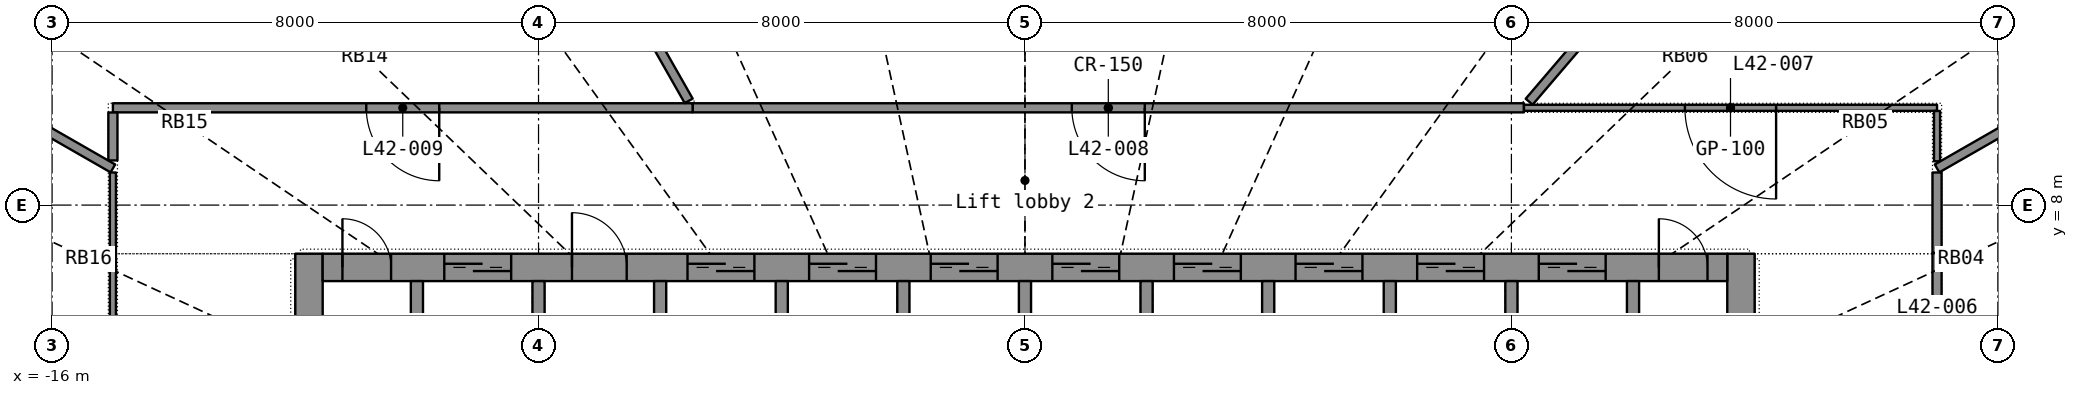
"""IFC4 building model, lengths in metres.
Left out: names, types, materials, properties, quantities, classifications, styles, units other than length and angle.
Written with IfcOpenShell. Run it as: python <this file> out.ifc"""

import sys

from ifc_helpers import new_model, si_unit, direction, frame, frame_2d, origin, place, context, subcontext, project, spatial, rectangle, extrude, element, fill, save


model = new_model("IFC4")
c1 = context("Model", 3, precision=1e-05, world=origin(), true_north=direction((0.0, 1.0)))
c2 = subcontext(c1, "Body", "Model", "MODEL_VIEW")
j1 = project(units=[si_unit("LENGTHUNIT", "METRE"), si_unit("PLANEANGLEUNIT", "RADIAN")], contexts=[c1])
p1 = place(None, origin())
s1 = spatial("IfcSite", under=j1, at=p1, CompositionType="ELEMENT")
p2 = place(p1, origin())
s2 = spatial("IfcBuilding", under=s1, at=p2, CompositionType="ELEMENT")
p3 = place(p2, frame((0.0, 0.0, 175.6)))
s3 = spatial("IfcBuildingStorey", under=s2, at=p3, CompositionType="ELEMENT", Elevation=175.6)
p4 = place(p3, frame((-11.775, -7.2, 0.0), z_axis=(0.0, 0.0, 1.0), x_axis=(0.0, 1.0, 0.0)))
e1 = element("IfcWall", 1, at=p4, inside=s3, PredefinedType="SHEAR", context=c2, shape_type="SweptSolid", body=[
    extrude(rectangle(XDim=14.4, YDim=0.45, at=frame_2d((7.2, 0.0))), origin(), (0.0, 0.0, 1.0), 3.3),
])
p5 = place(p4, frame((6.5, 0.0, 0.0)))
e2 = element("IfcOpeningElement", 2, at=p5, cuts=e1, PredefinedType="OPENING", context=c2, shape_type="SweptSolid", body=[
    extrude(rectangle(XDim=1.4, YDim=2.2, at=frame_2d((0.7, 1.1))), frame((0.0, 0.235, 0.0), z_axis=(0.0, -1.0, 0.0), x_axis=(1.0, 0.0, 0.0)), (0.0, 0.0, 1.0), 0.47),
])
p6 = place(p3, frame((11.775, -7.2, 0.0), z_axis=(0.0, 0.0, 1.0), x_axis=(0.0, 1.0, 0.0)))
e3 = element("IfcWall", 3, at=p6, inside=s3, PredefinedType="SHEAR", context=c2, shape_type="SweptSolid", body=[
    extrude(rectangle(XDim=14.4, YDim=0.45, at=frame_2d((7.2, 0.0))), origin(), (0.0, 0.0, 1.0), 3.3),
])
p7 = place(p6, frame((6.5, 0.0, 0.0)))
e4 = element("IfcOpeningElement", 4, at=p7, cuts=e3, PredefinedType="OPENING", context=c2, shape_type="SweptSolid", body=[
    extrude(rectangle(XDim=1.4, YDim=2.2, at=frame_2d((0.7, 1.1))), frame((0.0, 0.235, 0.0), z_axis=(0.0, -1.0, 0.0), x_axis=(1.0, 0.0, 0.0)), (0.0, 0.0, 1.0), 0.47),
])
p8 = place(p3, frame((-11.55, 6.975, 0.0), z_axis=(0.0, 0.0, 1.0), x_axis=(1.0, 0.0, 0.0)))
e5 = element("IfcWall", 5, at=p8, inside=s3, PredefinedType="SHEAR", context=c2, shape_type="SweptSolid", body=[
    extrude(rectangle(XDim=23.1, YDim=0.45, at=frame_2d((11.55, 0.0))), origin(), (0.0, 0.0, 1.0), 3.3),
])
p9 = place(p8, frame((2.0, 0.0, 0.0)))
e6 = element("IfcOpeningElement", 6, at=p9, cuts=e5, PredefinedType="OPENING", context=c2, shape_type="SweptSolid", body=[
    extrude(rectangle(XDim=1.1, YDim=2.2, at=frame_2d((0.55, 1.1))), frame((0.0, 0.235, 0.0), z_axis=(0.0, -1.0, 0.0), x_axis=(1.0, 0.0, 0.0)), (0.0, 0.0, 1.0), 0.47),
])
p10 = place(p8, frame((6.0, 0.0, 0.0)))
e7 = element("IfcOpeningElement", 7, at=p10, cuts=e5, PredefinedType="OPENING", context=c2, shape_type="SweptSolid", body=[
    extrude(rectangle(XDim=1.1, YDim=2.2, at=frame_2d((0.55, 1.1))), frame((0.0, 0.235, 0.0), z_axis=(0.0, -1.0, 0.0), x_axis=(1.0, 0.0, 0.0)), (0.0, 0.0, 1.0), 0.47),
])
p11 = place(p8, frame((8.0, 0.0, 0.0)))
e8 = element("IfcOpeningElement", 8, at=p11, cuts=e5, PredefinedType="OPENING", context=c2, shape_type="SweptSolid", body=[
    extrude(rectangle(XDim=1.1, YDim=2.2, at=frame_2d((0.55, 1.1))), frame((0.0, 0.235, 0.0), z_axis=(0.0, -1.0, 0.0), x_axis=(1.0, 0.0, 0.0)), (0.0, 0.0, 1.0), 0.47),
])
p12 = place(p8, frame((10.0, 0.0, 0.0)))
e9 = element("IfcOpeningElement", 9, at=p12, cuts=e5, PredefinedType="OPENING", context=c2, shape_type="SweptSolid", body=[
    extrude(rectangle(XDim=1.1, YDim=2.2, at=frame_2d((0.55, 1.1))), frame((0.0, 0.235, 0.0), z_axis=(0.0, -1.0, 0.0), x_axis=(1.0, 0.0, 0.0)), (0.0, 0.0, 1.0), 0.47),
])
p13 = place(p8, frame((12.0, 0.0, 0.0)))
e10 = element("IfcOpeningElement", 10, at=p13, cuts=e5, PredefinedType="OPENING", context=c2, shape_type="SweptSolid", body=[
    extrude(rectangle(XDim=1.1, YDim=2.2, at=frame_2d((0.55, 1.1))), frame((0.0, 0.235, 0.0), z_axis=(0.0, -1.0, 0.0), x_axis=(1.0, 0.0, 0.0)), (0.0, 0.0, 1.0), 0.47),
])
p14 = place(p8, frame((14.0, 0.0, 0.0)))
e11 = element("IfcOpeningElement", 11, at=p14, cuts=e5, PredefinedType="OPENING", context=c2, shape_type="SweptSolid", body=[
    extrude(rectangle(XDim=1.1, YDim=2.2, at=frame_2d((0.55, 1.1))), frame((0.0, 0.235, 0.0), z_axis=(0.0, -1.0, 0.0), x_axis=(1.0, 0.0, 0.0)), (0.0, 0.0, 1.0), 0.47),
])
p15 = place(p8, frame((16.0, 0.0, 0.0)))
e12 = element("IfcOpeningElement", 12, at=p15, cuts=e5, PredefinedType="OPENING", context=c2, shape_type="SweptSolid", body=[
    extrude(rectangle(XDim=1.1, YDim=2.2, at=frame_2d((0.55, 1.1))), frame((0.0, 0.235, 0.0), z_axis=(0.0, -1.0, 0.0), x_axis=(1.0, 0.0, 0.0)), (0.0, 0.0, 1.0), 0.47),
])
p16 = place(p8, frame((18.0, 0.0, 0.0)))
e13 = element("IfcOpeningElement", 13, at=p16, cuts=e5, PredefinedType="OPENING", context=c2, shape_type="SweptSolid", body=[
    extrude(rectangle(XDim=1.1, YDim=2.2, at=frame_2d((0.55, 1.1))), frame((0.0, 0.235, 0.0), z_axis=(0.0, -1.0, 0.0), x_axis=(1.0, 0.0, 0.0)), (0.0, 0.0, 1.0), 0.47),
])
p17 = place(p8, frame((20.0, 0.0, 0.0)))
e14 = element("IfcOpeningElement", 14, at=p17, cuts=e5, PredefinedType="OPENING", context=c2, shape_type="SweptSolid", body=[
    extrude(rectangle(XDim=1.1, YDim=2.2, at=frame_2d((0.55, 1.1))), frame((0.0, 0.235, 0.0), z_axis=(0.0, -1.0, 0.0), x_axis=(1.0, 0.0, 0.0)), (0.0, 0.0, 1.0), 0.47),
])
p18 = place(p8, frame((4.1, 0.0, 0.0)))
e15 = element("IfcOpeningElement", 15, at=p18, cuts=e5, PredefinedType="OPENING", context=c2, shape_type="SweptSolid", body=[
    extrude(rectangle(XDim=0.9, YDim=2.1, at=frame_2d((0.45, 1.05))), frame((0.0, 0.235, 0.0), z_axis=(0.0, -1.0, 0.0), x_axis=(1.0, 0.0, 0.0)), (0.0, 0.0, 1.0), 0.47),
])
p19 = place(p8, frame((0.325, 0.0, 0.0)))
e16 = element("IfcOpeningElement", 16, at=p19, cuts=e5, PredefinedType="OPENING", context=c2, shape_type="SweptSolid", body=[
    extrude(rectangle(XDim=0.8, YDim=2.05, at=frame_2d((0.4, 1.025))), frame((0.0, 0.235, 0.0), z_axis=(0.0, -1.0, 0.0), x_axis=(1.0, 0.0, 0.0)), (0.0, 0.0, 1.0), 0.47),
])
p20 = place(p8, frame((21.975, 0.0, 0.0)))
e17 = element("IfcOpeningElement", 17, at=p20, cuts=e5, PredefinedType="OPENING", context=c2, shape_type="SweptSolid", body=[
    extrude(rectangle(XDim=0.8, YDim=2.05, at=frame_2d((0.4, 1.025))), frame((0.0, 0.235, 0.0), z_axis=(0.0, -1.0, 0.0), x_axis=(1.0, 0.0, 0.0)), (0.0, 0.0, 1.0), 0.47),
])
for number, where, z_axis, x_axis in (
    (18, (-10.0, 3.9, 0.0), (0.0, 0.0, 1.0), (0.0, 1.0, 0.0)),
    (19, (-8.0, 3.9, 0.0), (0.0, 0.0, 1.0), (0.0, 1.0, 0.0)),
    (20, (-6.0, 3.9, 0.0), (0.0, 0.0, 1.0), (0.0, 1.0, 0.0)),
    (21, (-4.0, 3.9, 0.0), (0.0, 0.0, 1.0), (0.0, 1.0, 0.0)),
    (22, (-2.0, 3.9, 0.0), (0.0, 0.0, 1.0), (0.0, 1.0, 0.0)),
    (23, (0.0, 3.9, 0.0), (0.0, 0.0, 1.0), (0.0, 1.0, 0.0)),
    (24, (2.0, 3.9, 0.0), (0.0, 0.0, 1.0), (0.0, 1.0, 0.0)),
    (25, (4.0, 3.9, 0.0), (0.0, 0.0, 1.0), (0.0, 1.0, 0.0)),
    (26, (6.0, 3.9, 0.0), (0.0, 0.0, 1.0), (0.0, 1.0, 0.0)),
    (27, (8.0, 3.9, 0.0), (0.0, 0.0, 1.0), (0.0, 1.0, 0.0)),
    (28, (10.0, 3.9, 0.0), (0.0, 0.0, 1.0), (0.0, 1.0, 0.0)),
):
    element("IfcWall", number, at=place(p3, frame(where, z_axis=z_axis, x_axis=x_axis)), inside=s3, PredefinedType="SHEAR", context=c2, shape_type="SweptSolid", body=[
        extrude(rectangle(XDim=2.85, YDim=0.2, at=frame_2d((1.425, 0.0))), origin(), (0.0, 0.0, 1.0), 3.3),
    ])
p21 = place(p3, frame((8.206, 9.6, 0.0), z_axis=(0.0, 0.0, 1.0), x_axis=(-1.0, 0.0, 0.0)))
e29 = element("IfcWall", 29, at=p21, inside=s3, PredefinedType="PARTITIONING", context=c2, shape_type="SweptSolid", body=[
    extrude(rectangle(XDim=13.671, YDim=0.15, at=frame_2d((6.836, 0.0))), origin(), (0.0, 0.0, 1.0), 2.4),
])
p22 = place(p21, frame((6.236, 0.0, 0.0)))
e30 = element("IfcOpeningElement", 30, at=p22, cuts=e29, PredefinedType="OPENING", context=c2, shape_type="SweptSolid", body=[
    extrude(rectangle(XDim=1.2, YDim=2.2, at=frame_2d((0.6, 1.1))), frame((0.0, 0.085, 0.0), z_axis=(0.0, -1.0, 0.0), x_axis=(1.0, 0.0, 0.0)), (0.0, 0.0, 1.0), 0.17),
])
p23 = place(p3, frame((-5.466, 9.6, 0.0), z_axis=(0.0, 0.0, 1.0), x_axis=(-1.0, 0.0, 0.0)))
e31 = element("IfcWall", 31, at=p23, inside=s3, PredefinedType="PARTITIONING", context=c2, shape_type="SweptSolid", body=[
    extrude(rectangle(XDim=9.534, YDim=0.15, at=frame_2d((4.767, 0.0))), origin(), (0.0, 0.0, 1.0), 2.4),
])
p24 = place(p23, frame((4.167, 0.0, 0.0)))
e32 = element("IfcOpeningElement", 32, at=p24, cuts=e31, PredefinedType="OPENING", context=c2, shape_type="SweptSolid", body=[
    extrude(rectangle(XDim=1.2, YDim=2.2, at=frame_2d((0.6, 1.1))), frame((0.0, 0.085, 0.0), z_axis=(0.0, -1.0, 0.0), x_axis=(1.0, 0.0, 0.0)), (0.0, 0.0, 1.0), 0.17),
])
p25 = place(p3, frame((-9.883, 17.361, 0.0), z_axis=(0.0, 0.0, 1.0), x_axis=(0.494742876, -0.869039404, 0.0)))
e33 = element("IfcWall", 33, at=p25, inside=s3, PredefinedType="PARTITIONING", context=c2, shape_type="SweptSolid", body=[
    extrude(rectangle(XDim=8.799, YDim=0.15, at=frame_2d((4.399, 0.0))), origin(), (0.0, 0.0, 1.0), 2.4),
])
p26 = place(p3, frame((15.0, 9.6, 0.0), z_axis=(0.0, 0.0, 1.0), x_axis=(-1.0, 0.0, 0.0)))
e34 = element("IfcWall", 34, at=p26, inside=s3, PredefinedType="PARTITIONING", context=c2, shape_type="SweptSolid", body=[
    extrude(rectangle(XDim=6.794, YDim=0.1, at=frame_2d((3.397, 0.0))), origin(), (0.0, 0.0, 1.0), 2.4),
])
p27 = place(p26, frame((2.647, 0.0, 0.0)))
e35 = element("IfcOpeningElement", 35, at=p27, cuts=e34, PredefinedType="OPENING", context=c2, shape_type="SweptSolid", body=[
    extrude(rectangle(XDim=1.5, YDim=2.4, at=frame_2d((0.75, 1.2))), frame((0.0, 0.06, 0.0), z_axis=(0.0, -1.0, 0.0), x_axis=(1.0, 0.0, 0.0)), (0.0, 0.0, 1.0), 0.12),
])
p28 = place(p3, frame((12.064, 14.113, 0.0), z_axis=(0.0, 0.0, 1.0), x_axis=(-0.649793299, -0.760110958, 0.0)))
e36 = element("IfcWall", 36, at=p28, inside=s3, PredefinedType="PARTITIONING", context=c2, shape_type="SweptSolid", body=[
    extrude(rectangle(XDim=5.805, YDim=0.15, at=frame_2d((2.902, 0.0))), origin(), (0.0, 0.0, 1.0), 2.4),
])
p29 = place(p3, frame((-19.169, 10.994, 0.0), z_axis=(0.0, 0.0, 1.0), x_axis=(0.867457349, -0.497511556, 0.0)))
e37 = element("IfcWall", 37, at=p29, inside=s3, PredefinedType="PARTITIONING", context=c2, shape_type="SweptSolid", body=[
    extrude(rectangle(XDim=4.806, YDim=0.15, at=frame_2d((2.403, 0.0))), origin(), (0.0, 0.0, 1.0), 2.4),
])
p30 = place(p3, frame((19.167, 10.993, 0.0), z_axis=(0.0, 0.0, 1.0), x_axis=(-0.867466381, -0.497495807, 0.0)))
e38 = element("IfcWall", 38, at=p30, inside=s3, PredefinedType="PARTITIONING", context=c2, shape_type="SweptSolid", body=[
    extrude(rectangle(XDim=4.803, YDim=0.15, at=frame_2d((2.402, 0.0))), origin(), (0.0, 0.0, 1.0), 2.4),
])
p31 = place(p3, frame((-15.0, 7.212, 0.0), z_axis=(0.0, 0.0, 1.0), x_axis=(0.0, -1.0, 0.0)))
e39 = element("IfcWall", 39, at=p31, inside=s3, PredefinedType="PARTITIONING", context=c2, shape_type="SweptSolid", body=[
    extrude(rectangle(XDim=3.83, YDim=0.1, at=frame_2d((1.915, 0.0))), origin(), (0.0, 0.0, 1.0), 2.4),
])
p32 = place(p31, frame((1.165, 0.0, 0.0)))
e40 = element("IfcOpeningElement", 40, at=p32, cuts=e39, PredefinedType="OPENING", context=c2, shape_type="SweptSolid", body=[
    extrude(rectangle(XDim=1.5, YDim=2.4, at=frame_2d((0.75, 1.2))), frame((0.0, 0.06, 0.0), z_axis=(0.0, -1.0, 0.0), x_axis=(1.0, 0.0, 0.0)), (0.0, 0.0, 1.0), 0.12),
])
p33 = place(p3, frame((15.0, 3.387, 0.0), z_axis=(0.0, 0.0, 1.0), x_axis=(0.0, 1.0, 0.0)))
e41 = element("IfcWall", 41, at=p33, inside=s3, PredefinedType="PARTITIONING", context=c2, shape_type="SweptSolid", body=[
    extrude(rectangle(XDim=3.824, YDim=0.15, at=frame_2d((1.912, 0.0))), origin(), (0.0, 0.0, 1.0), 2.4),
])
p34 = place(p33, frame((1.437, 0.0, 0.0)))
e42 = element("IfcOpeningElement", 42, at=p34, cuts=e41, PredefinedType="OPENING", context=c2, shape_type="SweptSolid", body=[
    extrude(rectangle(XDim=0.95, YDim=2.15, at=frame_2d((0.475, 1.075))), frame((0.0, 0.085, 0.0), z_axis=(0.0, -1.0, 0.0), x_axis=(1.0, 0.0, 0.0)), (0.0, 0.0, 1.0), 0.17),
])
p35 = place(p3, frame((-15.0, 8.536, 0.0), z_axis=(0.0, 0.0, 1.0), x_axis=(0.0, -1.0, 0.0)))
e43 = element("IfcWall", 43, at=p35, inside=s3, PredefinedType="PARTITIONING", context=c2, shape_type="SweptSolid", body=[
    extrude(rectangle(XDim=1.323, YDim=0.1, at=frame_2d((0.662, 0.0))), origin(), (0.0, 0.0, 1.0), 2.4),
])
p36 = place(p3, frame((15.0, 7.213, 0.0), z_axis=(0.0, 0.0, 1.0), x_axis=(0.0, 1.0, 0.0)))
e44 = element("IfcWall", 44, at=p36, inside=s3, PredefinedType="PARTITIONING", context=c2, shape_type="SweptSolid", body=[
    extrude(rectangle(XDim=1.323, YDim=0.15, at=frame_2d((0.662, 0.0))), origin(), (0.0, 0.0, 1.0), 2.4),
])
p37 = place(p3, frame((-15.0, 9.523, 0.0), z_axis=(0.0, 0.0, 1.0), x_axis=(0.0, -1.0, 0.0)))
e45 = element("IfcWall", 45, at=p37, inside=s3, PredefinedType="PARTITIONING", context=c2, shape_type="SweptSolid", body=[
    extrude(rectangle(XDim=0.788, YDim=0.15, at=frame_2d((0.394, 0.0))), origin(), (0.0, 0.0, 1.0), 2.4),
])
p38 = place(p3, frame((15.0, 8.72, 0.0), z_axis=(0.0, 0.0, 1.0), x_axis=(0.0, 1.0, 0.0)))
e46 = element("IfcWall", 46, at=p38, inside=s3, PredefinedType="PARTITIONING", context=c2, shape_type="SweptSolid", body=[
    extrude(rectangle(XDim=0.828, YDim=0.1, at=frame_2d((0.414, 0.0))), origin(), (0.0, 0.0, 1.0), 2.4),
])
p39 = place(p9, origin())
e47 = element("IfcDoor", 47, at=p39, inside=s3, OperationType="DOUBLE_DOOR_SLIDING", PredefinedType="DOOR", context=c2, shape_type="SweptSolid", body=[
    extrude(rectangle(XDim=1.1, YDim=2.2, at=frame_2d((0.55, 1.1))), frame((0.0, 0.025, 0.0), z_axis=(0.0, -1.0, 0.0), x_axis=(1.0, 0.0, 0.0)), (0.0, 0.0, 1.0), 0.05),
])
fill(e6, e47)
p40 = place(p10, origin())
e48 = element("IfcDoor", 48, at=p40, inside=s3, OperationType="DOUBLE_DOOR_SLIDING", PredefinedType="DOOR", context=c2, shape_type="SweptSolid", body=[
    extrude(rectangle(XDim=1.1, YDim=2.2, at=frame_2d((0.55, 1.1))), frame((0.0, 0.025, 0.0), z_axis=(0.0, -1.0, 0.0), x_axis=(1.0, 0.0, 0.0)), (0.0, 0.0, 1.0), 0.05),
])
fill(e7, e48)
p41 = place(p11, origin())
e49 = element("IfcDoor", 49, at=p41, inside=s3, OperationType="DOUBLE_DOOR_SLIDING", PredefinedType="DOOR", context=c2, shape_type="SweptSolid", body=[
    extrude(rectangle(XDim=1.1, YDim=2.2, at=frame_2d((0.55, 1.1))), frame((0.0, 0.025, 0.0), z_axis=(0.0, -1.0, 0.0), x_axis=(1.0, 0.0, 0.0)), (0.0, 0.0, 1.0), 0.05),
])
fill(e8, e49)
p42 = place(p12, origin())
e50 = element("IfcDoor", 50, at=p42, inside=s3, OperationType="DOUBLE_DOOR_SLIDING", PredefinedType="DOOR", context=c2, shape_type="SweptSolid", body=[
    extrude(rectangle(XDim=1.1, YDim=2.2, at=frame_2d((0.55, 1.1))), frame((0.0, 0.025, 0.0), z_axis=(0.0, -1.0, 0.0), x_axis=(1.0, 0.0, 0.0)), (0.0, 0.0, 1.0), 0.05),
])
fill(e9, e50)
p43 = place(p13, origin())
e51 = element("IfcDoor", 51, at=p43, inside=s3, OperationType="DOUBLE_DOOR_SLIDING", PredefinedType="DOOR", context=c2, shape_type="SweptSolid", body=[
    extrude(rectangle(XDim=1.1, YDim=2.2, at=frame_2d((0.55, 1.1))), frame((0.0, 0.025, 0.0), z_axis=(0.0, -1.0, 0.0), x_axis=(1.0, 0.0, 0.0)), (0.0, 0.0, 1.0), 0.05),
])
fill(e10, e51)
p44 = place(p14, origin())
e52 = element("IfcDoor", 52, at=p44, inside=s3, OperationType="DOUBLE_DOOR_SLIDING", PredefinedType="DOOR", context=c2, shape_type="SweptSolid", body=[
    extrude(rectangle(XDim=1.1, YDim=2.2, at=frame_2d((0.55, 1.1))), frame((0.0, 0.025, 0.0), z_axis=(0.0, -1.0, 0.0), x_axis=(1.0, 0.0, 0.0)), (0.0, 0.0, 1.0), 0.05),
])
fill(e11, e52)
p45 = place(p15, origin())
e53 = element("IfcDoor", 53, at=p45, inside=s3, OperationType="DOUBLE_DOOR_SLIDING", PredefinedType="DOOR", context=c2, shape_type="SweptSolid", body=[
    extrude(rectangle(XDim=1.1, YDim=2.2, at=frame_2d((0.55, 1.1))), frame((0.0, 0.025, 0.0), z_axis=(0.0, -1.0, 0.0), x_axis=(1.0, 0.0, 0.0)), (0.0, 0.0, 1.0), 0.05),
])
fill(e12, e53)
p46 = place(p16, origin())
e54 = element("IfcDoor", 54, at=p46, inside=s3, OperationType="DOUBLE_DOOR_SLIDING", PredefinedType="DOOR", context=c2, shape_type="SweptSolid", body=[
    extrude(rectangle(XDim=1.1, YDim=2.2, at=frame_2d((0.55, 1.1))), frame((0.0, 0.025, 0.0), z_axis=(0.0, -1.0, 0.0), x_axis=(1.0, 0.0, 0.0)), (0.0, 0.0, 1.0), 0.05),
])
fill(e13, e54)
p47 = place(p17, origin())
e55 = element("IfcDoor", 55, at=p47, inside=s3, OperationType="DOUBLE_DOOR_SLIDING", PredefinedType="DOOR", context=c2, shape_type="SweptSolid", body=[
    extrude(rectangle(XDim=1.1, YDim=2.2, at=frame_2d((0.55, 1.1))), frame((0.0, 0.025, 0.0), z_axis=(0.0, -1.0, 0.0), x_axis=(1.0, 0.0, 0.0)), (0.0, 0.0, 1.0), 0.05),
])
fill(e14, e55)
p48 = place(p18, origin())
e56 = element("IfcDoor", 56, at=p48, inside=s3, OperationType="SINGLE_SWING_LEFT", PredefinedType="DOOR", context=c2, shape_type="SweptSolid", body=[
    extrude(rectangle(XDim=0.9, YDim=2.1, at=frame_2d((0.45, 1.05))), frame((0.0, 0.025, 0.0), z_axis=(0.0, -1.0, 0.0), x_axis=(1.0, 0.0, 0.0)), (0.0, 0.0, 1.0), 0.05),
])
fill(e15, e56)
p49 = place(p19, origin())
e57 = element("IfcDoor", 57, at=p49, inside=s3, OperationType="SINGLE_SWING_LEFT", PredefinedType="DOOR", context=c2, shape_type="SweptSolid", body=[
    extrude(rectangle(XDim=0.8, YDim=2.05, at=frame_2d((0.4, 1.025))), frame((0.0, 0.025, 0.0), z_axis=(0.0, -1.0, 0.0), x_axis=(1.0, 0.0, 0.0)), (0.0, 0.0, 1.0), 0.05),
])
fill(e16, e57)
p50 = place(p20, origin())
e58 = element("IfcDoor", 58, at=p50, inside=s3, OperationType="SINGLE_SWING_LEFT", PredefinedType="DOOR", context=c2, shape_type="SweptSolid", body=[
    extrude(rectangle(XDim=0.8, YDim=2.05, at=frame_2d((0.4, 1.025))), frame((0.0, 0.025, 0.0), z_axis=(0.0, -1.0, 0.0), x_axis=(1.0, 0.0, 0.0)), (0.0, 0.0, 1.0), 0.05),
])
fill(e17, e58)
p51 = place(p27, origin())
e59 = element("IfcDoor", 59, at=p51, inside=s3, OperationType="DOUBLE_DOOR_SINGLE_SWING", PredefinedType="DOOR", context=c2, shape_type="SweptSolid", body=[
    extrude(rectangle(XDim=1.5, YDim=2.4, at=frame_2d((0.75, 1.2))), frame((0.0, 0.025, 0.0), z_axis=(0.0, -1.0, 0.0), x_axis=(1.0, 0.0, 0.0)), (0.0, 0.0, 1.0), 0.05),
])
fill(e35, e59)
p52 = place(p22, origin())
e60 = element("IfcDoor", 60, at=p52, inside=s3, OperationType="DOUBLE_DOOR_SINGLE_SWING", PredefinedType="DOOR", context=c2, shape_type="SweptSolid", body=[
    extrude(rectangle(XDim=1.2, YDim=2.2, at=frame_2d((0.6, 1.1))), frame((0.0, 0.025, 0.0), z_axis=(0.0, -1.0, 0.0), x_axis=(1.0, 0.0, 0.0)), (0.0, 0.0, 1.0), 0.05),
])
fill(e30, e60)
p53 = place(p24, origin())
e61 = element("IfcDoor", 61, at=p53, inside=s3, OperationType="DOUBLE_DOOR_SINGLE_SWING", PredefinedType="DOOR", context=c2, shape_type="SweptSolid", body=[
    extrude(rectangle(XDim=1.2, YDim=2.2, at=frame_2d((0.6, 1.1))), frame((0.0, 0.025, 0.0), z_axis=(0.0, -1.0, 0.0), x_axis=(1.0, 0.0, 0.0)), (0.0, 0.0, 1.0), 0.05),
])
fill(e32, e61)
save(model, sys.argv[1])
